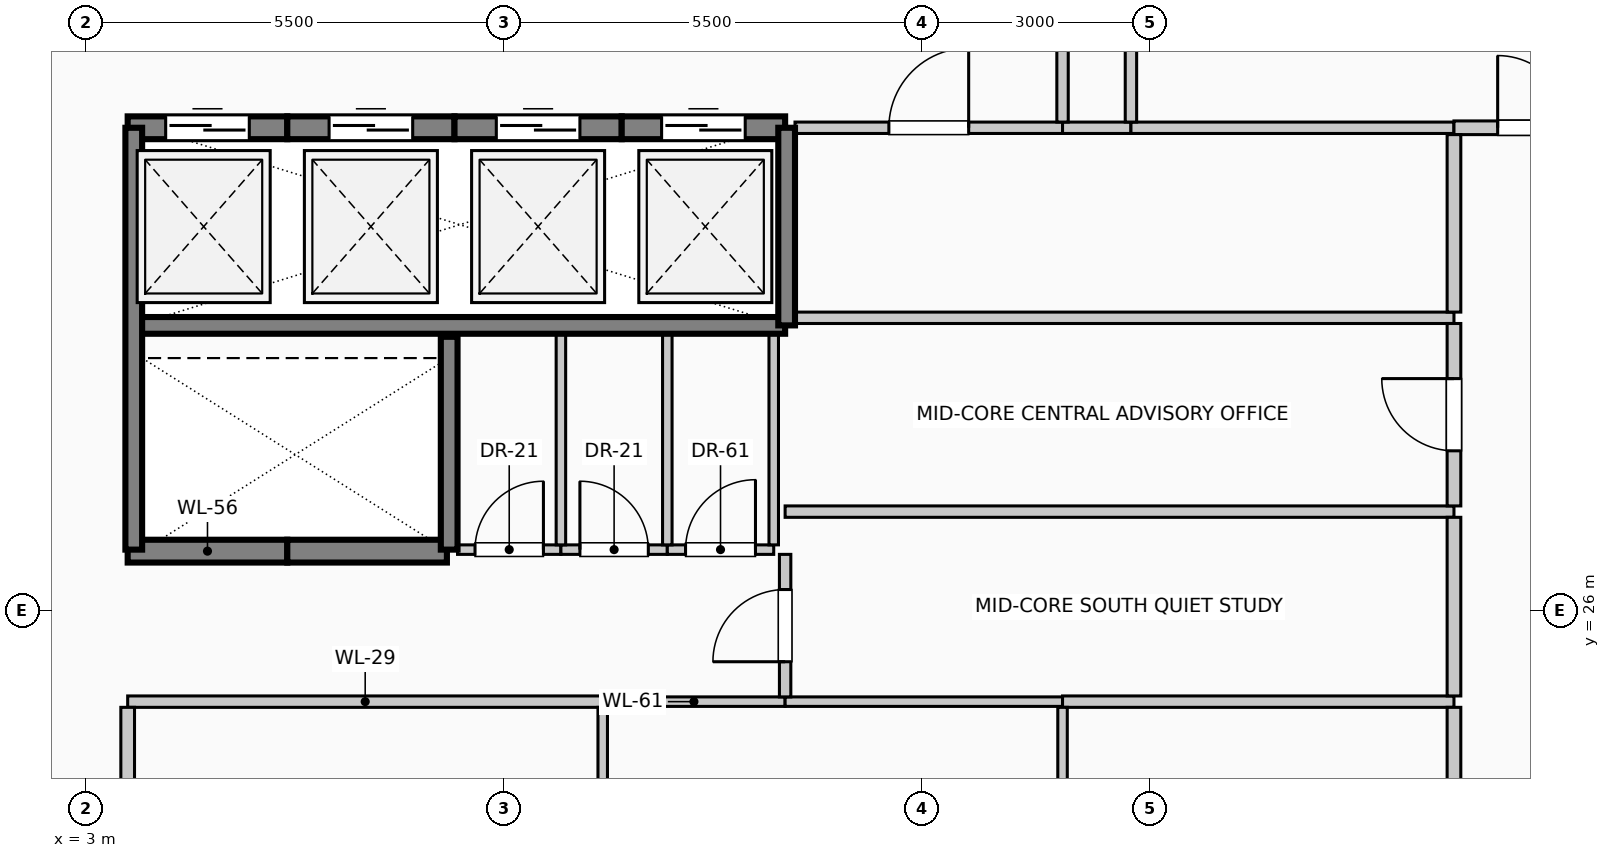
"""IFC4 building model, lengths in metres.
Left out: names, types, materials, properties, quantities, classifications, styles, units other than length and angle.
Written with IfcOpenShell. Run it as: python <this file> out.ifc"""

import sys

from ifc_helpers import new_model, si_unit, direction, frame, frame_2d, origin, place, context, subcontext, project, spatial, rectangle, extrude, element, fill, save


model = new_model("IFC4")
c1 = context("Model", 3, precision=1e-05, world=origin(), true_north=direction((0.0, 1.0)))
c2 = subcontext(c1, "Body", "Model", "MODEL_VIEW")
j1 = project(units=[si_unit("LENGTHUNIT", "METRE"), si_unit("PLANEANGLEUNIT", "RADIAN")], contexts=[c1])
p1 = place(None, origin())
s1 = spatial("IfcSite", under=j1, at=p1, CompositionType="ELEMENT")
p2 = place(p1, origin())
s2 = spatial("IfcBuilding", under=s1, at=p2, CompositionType="ELEMENT")
p3 = place(p2, frame((0.0, 0.0, 252.6)))
s3 = spatial("IfcBuildingStorey", under=s2, at=p3, CompositionType="ELEMENT", Elevation=252.6)
p4 = place(p3, frame((3.55, 32.35, 0.0), z_axis=(0.0, 0.0, 1.0), x_axis=(1.0, 0.0, 0.0)))
e1 = element("IfcWall", 1, at=p4, inside=s3, PredefinedType="SOLIDWALL", context=c2, shape_type="SweptSolid", body=[
    extrude(rectangle(XDim=2.1, YDim=0.3, at=frame_2d((1.05, 0.0))), origin(), (0.0, 0.0, 1.0), 4.0),
])
p5 = place(p4, frame((0.5, 0.0, 0.0)))
e2 = element("IfcOpeningElement", 2, at=p5, cuts=e1, PredefinedType="OPENING", context=c2, shape_type="SweptSolid", body=[
    extrude(rectangle(XDim=1.1, YDim=2.2, at=frame_2d((0.55, 1.1))), frame((0.0, 0.16, 0.0), z_axis=(0.0, -1.0, 0.0), x_axis=(1.0, 0.0, 0.0)), (0.0, 0.0, 1.0), 0.32),
])
p6 = place(p3, frame((5.65, 32.35, 0.0), z_axis=(0.0, 0.0, 1.0), x_axis=(1.0, 0.0, 0.0)))
e3 = element("IfcWall", 3, at=p6, inside=s3, PredefinedType="SOLIDWALL", context=c2, shape_type="SweptSolid", body=[
    extrude(rectangle(XDim=2.2, YDim=0.3, at=frame_2d((1.1, 0.0))), origin(), (0.0, 0.0, 1.0), 4.0),
])
p7 = place(p6, frame((0.55, 0.0, 0.0)))
e4 = element("IfcOpeningElement", 4, at=p7, cuts=e3, PredefinedType="OPENING", context=c2, shape_type="SweptSolid", body=[
    extrude(rectangle(XDim=1.1, YDim=2.2, at=frame_2d((0.55, 1.1))), frame((0.0, 0.16, 0.0), z_axis=(0.0, -1.0, 0.0), x_axis=(1.0, 0.0, 0.0)), (0.0, 0.0, 1.0), 0.32),
])
p8 = place(p3, frame((7.85, 32.35, 0.0), z_axis=(0.0, 0.0, 1.0), x_axis=(1.0, 0.0, 0.0)))
e5 = element("IfcWall", 5, at=p8, inside=s3, PredefinedType="SOLIDWALL", context=c2, shape_type="SweptSolid", body=[
    extrude(rectangle(XDim=2.2, YDim=0.3, at=frame_2d((1.1, 0.0))), origin(), (0.0, 0.0, 1.0), 4.0),
])
p9 = place(p8, frame((0.55, 0.0, 0.0)))
e6 = element("IfcOpeningElement", 6, at=p9, cuts=e5, PredefinedType="OPENING", context=c2, shape_type="SweptSolid", body=[
    extrude(rectangle(XDim=1.1, YDim=2.2, at=frame_2d((0.55, 1.1))), frame((0.0, 0.16, 0.0), z_axis=(0.0, -1.0, 0.0), x_axis=(1.0, 0.0, 0.0)), (0.0, 0.0, 1.0), 0.32),
])
p10 = place(p3, frame((10.05, 32.35, 0.0), z_axis=(0.0, 0.0, 1.0), x_axis=(1.0, 0.0, 0.0)))
e7 = element("IfcWall", 7, at=p10, inside=s3, PredefinedType="SOLIDWALL", context=c2, shape_type="SweptSolid", body=[
    extrude(rectangle(XDim=2.15, YDim=0.3, at=frame_2d((1.075, 0.0))), origin(), (0.0, 0.0, 1.0), 4.0),
])
p11 = place(p10, frame((0.525, 0.0, 0.0)))
e8 = element("IfcOpeningElement", 8, at=p11, cuts=e7, PredefinedType="OPENING", context=c2, shape_type="SweptSolid", body=[
    extrude(rectangle(XDim=1.1, YDim=2.2, at=frame_2d((0.55, 1.1))), frame((0.0, 0.16, 0.0), z_axis=(0.0, -1.0, 0.0), x_axis=(1.0, 0.0, 0.0)), (0.0, 0.0, 1.0), 0.32),
])
p12 = place(p3, frame((5.65, 26.78, 0.0), z_axis=(0.0, 0.0, 1.0), x_axis=(-1.0, 0.0, 0.0)))
e9 = element("IfcWall", 9, at=p12, inside=s3, PredefinedType="SOLIDWALL", context=c2, shape_type="SweptSolid", body=[
    extrude(rectangle(XDim=2.1, YDim=0.3, at=frame_2d((1.05, 0.0))), origin(), (0.0, 0.0, 1.0), 4.0),
])
p13 = place(p3, frame((7.75, 26.78, 0.0), z_axis=(0.0, 0.0, 1.0), x_axis=(-1.0, 0.0, 0.0)))
e10 = element("IfcWall", 10, at=p13, inside=s3, PredefinedType="SOLIDWALL", context=c2, shape_type="SweptSolid", body=[
    extrude(rectangle(XDim=2.1, YDim=0.3, at=frame_2d((1.05, 0.0))), origin(), (0.0, 0.0, 1.0), 4.0),
])
p14 = place(p3, frame((3.55, 29.75, 0.0), z_axis=(0.0, 0.0, 1.0), x_axis=(1.0, 0.0, 0.0)))
e11 = element("IfcWall", 11, at=p14, inside=s3, PredefinedType="SOLIDWALL", context=c2, shape_type="SweptSolid", body=[
    extrude(rectangle(XDim=8.65, YDim=0.22, at=frame_2d((4.325, 0.0))), origin(), (0.0, 0.0, 1.0), 4.0),
])
p15 = place(p3, frame((3.63, 26.8, 0.0), z_axis=(0.0, 0.0, 1.0), x_axis=(0.0, 1.0, 0.0)))
e12 = element("IfcWall", 12, at=p15, inside=s3, PredefinedType="SOLIDWALL", context=c2, shape_type="SweptSolid", body=[
    extrude(rectangle(XDim=5.55, YDim=0.22, at=frame_2d((2.775, 0.0))), origin(), (0.0, 0.0, 1.0), 4.0),
])
p16 = place(p3, frame((7.78, 26.8, 0.0), z_axis=(0.0, 0.0, 1.0), x_axis=(0.0, 1.0, 0.0)))
e13 = element("IfcWall", 13, at=p16, inside=s3, PredefinedType="SOLIDWALL", context=c2, shape_type="SweptSolid", body=[
    extrude(rectangle(XDim=2.8, YDim=0.22, at=frame_2d((1.4, 0.0))), origin(), (0.0, 0.0, 1.0), 4.0),
])
p17 = place(p3, frame((12.22, 29.75, 0.0), z_axis=(0.0, 0.0, 1.0), x_axis=(0.0, 1.0, 0.0)))
e14 = element("IfcWall", 14, at=p17, inside=s3, PredefinedType="SOLIDWALL", context=c2, shape_type="SweptSolid", body=[
    extrude(rectangle(XDim=2.6, YDim=0.22, at=frame_2d((1.3, 0.0))), origin(), (0.0, 0.0, 1.0), 4.0),
])
p18 = place(p3, frame((3.55, 24.8, 0.0), z_axis=(0.0, 0.0, 1.0), x_axis=(1.0, 0.0, 0.0)))
e15 = element("IfcWall", 15, at=p18, inside=s3, PredefinedType="PARTITIONING", context=c2, shape_type="SweptSolid", body=[
    extrude(rectangle(XDim=6.25, YDim=0.15, at=frame_2d((3.125, 0.0))), origin(), (0.0, 0.0, 1.0), 3.75),
])
p19 = place(p3, frame((9.8, 24.8, 0.0), z_axis=(0.0, 0.0, 1.0), x_axis=(1.0, 0.0, 0.0)))
e16 = element("IfcWall", 16, at=p19, inside=s3, PredefinedType="PARTITIONING", context=c2, shape_type="SweptSolid", body=[
    extrude(rectangle(XDim=2.4, YDim=0.125, at=frame_2d((1.2, 0.0))), origin(), (0.0, 0.0, 1.0), 3.75),
])
p20 = place(p3, frame((12.2, 24.8, 0.0), z_axis=(0.0, 0.0, 1.0), x_axis=(1.0, 0.0, 0.0)))
e17 = element("IfcWall", 17, at=p20, inside=s3, PredefinedType="PARTITIONING", context=c2, shape_type="SweptSolid", body=[
    extrude(rectangle(XDim=3.65, YDim=0.125, at=frame_2d((1.825, 0.0))), origin(), (0.0, 0.0, 1.0), 3.75),
])
p21 = place(p3, frame((15.85, 24.8, 0.0), z_axis=(0.0, 0.0, 1.0), x_axis=(1.0, 0.0, 0.0)))
e18 = element("IfcWall", 18, at=p21, inside=s3, PredefinedType="PARTITIONING", context=c2, shape_type="SweptSolid", body=[
    extrude(rectangle(XDim=5.15, YDim=0.15, at=frame_2d((2.575, 0.0))), origin(), (0.0, 0.0, 1.0), 3.75),
])
p22 = place(p3, frame((7.89, 26.8, 0.0), z_axis=(0.0, 0.0, 1.0), x_axis=(1.0, 0.0, 0.0)))
e19 = element("IfcWall", 19, at=p22, inside=s3, PredefinedType="PARTITIONING", context=c2, shape_type="SweptSolid", body=[
    extrude(rectangle(XDim=1.36, YDim=0.125, at=frame_2d((0.68, 0.0))), origin(), (0.0, 0.0, 1.0), 3.75),
])
p23 = place(p22, frame((0.23, 0.0, 0.0)))
e20 = element("IfcOpeningElement", 20, at=p23, cuts=e19, PredefinedType="OPENING", context=c2, shape_type="SweptSolid", body=[
    extrude(rectangle(XDim=0.9, YDim=2.1, at=frame_2d((0.45, 1.05))), frame((0.0, 0.073, 0.0), z_axis=(0.0, -1.0, 0.0), x_axis=(1.0, 0.0, 0.0)), (0.0, 0.0, 1.0), 0.145),
])
p24 = place(p3, frame((9.25, 26.8, 0.0), z_axis=(0.0, 0.0, 1.0), x_axis=(1.0, 0.0, 0.0)))
e21 = element("IfcWall", 21, at=p24, inside=s3, PredefinedType="PARTITIONING", context=c2, shape_type="SweptSolid", body=[
    extrude(rectangle(XDim=1.4, YDim=0.125, at=frame_2d((0.7, 0.0))), origin(), (0.0, 0.0, 1.0), 3.75),
])
p25 = place(p24, frame((0.25, 0.0, 0.0)))
e22 = element("IfcOpeningElement", 22, at=p25, cuts=e21, PredefinedType="OPENING", context=c2, shape_type="SweptSolid", body=[
    extrude(rectangle(XDim=0.9, YDim=2.1, at=frame_2d((0.45, 1.05))), frame((0.0, 0.073, 0.0), z_axis=(0.0, -1.0, 0.0), x_axis=(1.0, 0.0, 0.0)), (0.0, 0.0, 1.0), 0.145),
])
p26 = place(p3, frame((10.65, 26.8, 0.0), z_axis=(0.0, 0.0, 1.0), x_axis=(1.0, 0.0, 0.0)))
e23 = element("IfcWall", 23, at=p26, inside=s3, PredefinedType="PARTITIONING", context=c2, shape_type="SweptSolid", body=[
    extrude(rectangle(XDim=1.4, YDim=0.125, at=frame_2d((0.7, 0.0))), origin(), (0.0, 0.0, 1.0), 3.75),
])
p27 = place(p26, frame((0.24, 0.0, 0.0)))
e24 = element("IfcOpeningElement", 24, at=p27, cuts=e23, PredefinedType="OPENING", context=c2, shape_type="SweptSolid", body=[
    extrude(rectangle(XDim=0.92, YDim=2.1, at=frame_2d((0.46, 1.05))), frame((0.0, 0.073, 0.0), z_axis=(0.0, -1.0, 0.0), x_axis=(1.0, 0.0, 0.0)), (0.0, 0.0, 1.0), 0.145),
])
p28 = place(p3, frame((12.2, 27.3, 0.0), z_axis=(0.0, 0.0, 1.0), x_axis=(1.0, 0.0, 0.0)))
e25 = element("IfcWall", 25, at=p28, inside=s3, PredefinedType="PARTITIONING", context=c2, shape_type="SweptSolid", body=[
    extrude(rectangle(XDim=8.8, YDim=0.15, at=frame_2d((4.4, 0.0))), origin(), (0.0, 0.0, 1.0), 3.75),
])
p29 = place(p3, frame((12.33, 29.85, 0.0), z_axis=(0.0, 0.0, 1.0), x_axis=(1.0, 0.0, 0.0)))
e26 = element("IfcWall", 26, at=p29, inside=s3, PredefinedType="PARTITIONING", context=c2, shape_type="SweptSolid", body=[
    extrude(rectangle(XDim=8.67, YDim=0.15, at=frame_2d((4.335, 0.0))), origin(), (0.0, 0.0, 1.0), 3.75),
])
p30 = place(p3, frame((12.33, 32.35, 0.0), z_axis=(0.0, 0.0, 1.0), x_axis=(1.0, 0.0, 0.0)))
e27 = element("IfcWall", 27, at=p30, inside=s3, PredefinedType="PARTITIONING", context=c2, shape_type="SweptSolid", body=[
    extrude(rectangle(XDim=3.52, YDim=0.15, at=frame_2d((1.76, 0.0))), origin(), (0.0, 0.0, 1.0), 3.75),
])
p31 = place(p30, frame((1.235, 0.0, 0.0)))
e28 = element("IfcOpeningElement", 28, at=p31, cuts=e27, PredefinedType="OPENING", context=c2, shape_type="SweptSolid", body=[
    extrude(rectangle(XDim=1.05, YDim=2.15, at=frame_2d((0.525, 1.075))), frame((0.0, 0.085, 0.0), z_axis=(0.0, -1.0, 0.0), x_axis=(1.0, 0.0, 0.0)), (0.0, 0.0, 1.0), 0.17),
])
p32 = place(p3, frame((15.85, 32.35, 0.0), z_axis=(0.0, 0.0, 1.0), x_axis=(1.0, 0.0, 0.0)))
e29 = element("IfcWall", 29, at=p32, inside=s3, PredefinedType="PARTITIONING", context=c2, shape_type="SweptSolid", body=[
    extrude(rectangle(XDim=0.9, YDim=0.15, at=frame_2d((0.45, 0.0))), origin(), (0.0, 0.0, 1.0), 3.75),
])
p33 = place(p3, frame((16.75, 32.35, 0.0), z_axis=(0.0, 0.0, 1.0), x_axis=(1.0, 0.0, 0.0)))
e30 = element("IfcWall", 30, at=p33, inside=s3, PredefinedType="PARTITIONING", context=c2, shape_type="SweptSolid", body=[
    extrude(rectangle(XDim=4.25, YDim=0.15, at=frame_2d((2.125, 0.0))), origin(), (0.0, 0.0, 1.0), 3.75),
])
p34 = place(p3, frame((21.0, 32.35, 0.0), z_axis=(0.0, 0.0, 1.0), x_axis=(1.0, 0.0, 0.0)))
e31 = element("IfcWall", 31, at=p34, inside=s3, PredefinedType="PARTITIONING", context=c2, shape_type="SweptSolid", body=[
    extrude(rectangle(XDim=2.1, YDim=0.18, at=frame_2d((1.05, 0.0))), origin(), (0.0, 0.0, 1.0), 3.75),
])
p35 = place(p34, frame((0.575, 0.0, 0.0)))
e32 = element("IfcOpeningElement", 32, at=p35, cuts=e31, PredefinedType="OPENING", context=c2, shape_type="SweptSolid", body=[
    extrude(rectangle(XDim=0.95, YDim=2.15, at=frame_2d((0.475, 1.075))), frame((0.0, 0.1, 0.0), z_axis=(0.0, -1.0, 0.0), x_axis=(1.0, 0.0, 0.0)), (0.0, 0.0, 1.0), 0.2),
])
p36 = place(p3, frame((3.55, 17.39, 0.0), z_axis=(0.0, 0.0, 1.0), x_axis=(0.0, 1.0, 0.0)))
e33 = element("IfcWall", 33, at=p36, inside=s3, PredefinedType="PARTITIONING", context=c2, shape_type="SweptSolid", body=[
    extrude(rectangle(XDim=7.335, YDim=0.18, at=frame_2d((3.667, 0.0))), origin(), (0.0, 0.0, 1.0), 3.75),
])
p37 = place(p3, frame((9.25, 26.863, 0.0), z_axis=(0.0, 0.0, 1.0), x_axis=(0.0, 1.0, 0.0)))
e34 = element("IfcWall", 34, at=p37, inside=s3, PredefinedType="PARTITIONING", context=c2, shape_type="SweptSolid", body=[
    extrude(rectangle(XDim=2.777, YDim=0.125, at=frame_2d((1.389, 0.0))), origin(), (0.0, 0.0, 1.0), 3.75),
])
p38 = place(p3, frame((9.8, 17.39, 0.0), z_axis=(0.0, 0.0, 1.0), x_axis=(0.0, 1.0, 0.0)))
e35 = element("IfcWall", 35, at=p38, inside=s3, PredefinedType="PARTITIONING", context=c2, shape_type="SweptSolid", body=[
    extrude(rectangle(XDim=7.335, YDim=0.125, at=frame_2d((3.667, 0.0))), origin(), (0.0, 0.0, 1.0), 3.75),
])
for number, where, z_axis, x_axis in (
    (36, (10.65, 26.863, 0.0), (0.0, 0.0, 1.0), (0.0, 1.0, 0.0)),
    (37, (12.05, 26.863, 0.0), (0.0, 0.0, 1.0), (0.0, 1.0, 0.0)),
):
    element("IfcWall", number, at=place(p3, frame(where, z_axis=z_axis, x_axis=x_axis)), inside=s3, PredefinedType="PARTITIONING", context=c2, shape_type="SweptSolid", body=[
        extrude(rectangle(XDim=2.777, YDim=0.125, at=frame_2d((1.389, 0.0))), origin(), (0.0, 0.0, 1.0), 3.75),
    ])
p39 = place(p3, frame((12.2, 24.863, 0.0), z_axis=(0.0, 0.0, 1.0), x_axis=(0.0, 1.0, 0.0)))
e38 = element("IfcWall", 38, at=p39, inside=s3, PredefinedType="PARTITIONING", context=c2, shape_type="SweptSolid", body=[
    extrude(rectangle(XDim=1.875, YDim=0.15, at=frame_2d((0.938, 0.0))), origin(), (0.0, 0.0, 1.0), 3.75),
])
p40 = place(p39, frame((0.462, 0.0, 0.0)))
e39 = element("IfcOpeningElement", 39, at=p40, cuts=e38, PredefinedType="OPENING", context=c2, shape_type="SweptSolid", body=[
    extrude(rectangle(XDim=0.95, YDim=2.15, at=frame_2d((0.475, 1.075))), frame((0.0, 0.085, 0.0), z_axis=(0.0, -1.0, 0.0), x_axis=(1.0, 0.0, 0.0)), (0.0, 0.0, 1.0), 0.17),
])
p41 = place(p3, frame((15.85, 17.39, 0.0), z_axis=(0.0, 0.0, 1.0), x_axis=(0.0, 1.0, 0.0)))
e40 = element("IfcWall", 40, at=p41, inside=s3, PredefinedType="PARTITIONING", context=c2, shape_type="SweptSolid", body=[
    extrude(rectangle(XDim=7.335, YDim=0.125, at=frame_2d((3.667, 0.0))), origin(), (0.0, 0.0, 1.0), 3.75),
])
p42 = place(p3, frame((15.85, 32.425, 0.0), z_axis=(0.0, 0.0, 1.0), x_axis=(0.0, 1.0, 0.0)))
e41 = element("IfcWall", 41, at=p42, inside=s3, PredefinedType="PARTITIONING", context=c2, shape_type="SweptSolid", body=[
    extrude(rectangle(XDim=1.725, YDim=0.15, at=frame_2d((0.862, 0.0))), origin(), (0.0, 0.0, 1.0), 3.75),
])
p43 = place(p3, frame((16.75, 32.425, 0.0), z_axis=(0.0, 0.0, 1.0), x_axis=(0.0, 1.0, 0.0)))
e42 = element("IfcWall", 42, at=p43, inside=s3, PredefinedType="PARTITIONING", context=c2, shape_type="SweptSolid", body=[
    extrude(rectangle(XDim=1.15, YDim=0.15, at=frame_2d((0.575, 0.0))), origin(), (0.0, 0.0, 1.0), 3.75),
])
p44 = place(p3, frame((21.0, 17.39, 0.0), z_axis=(0.0, 0.0, 1.0), x_axis=(0.0, 1.0, 0.0)))
e43 = element("IfcWall", 43, at=p44, inside=s3, PredefinedType="PARTITIONING", context=c2, shape_type="SweptSolid", body=[
    extrude(rectangle(XDim=7.335, YDim=0.18, at=frame_2d((3.667, 0.0))), origin(), (0.0, 0.0, 1.0), 3.75),
])
p45 = place(p3, frame((21.0, 24.875, 0.0), z_axis=(0.0, 0.0, 1.0), x_axis=(0.0, 1.0, 0.0)))
e44 = element("IfcWall", 44, at=p45, inside=s3, PredefinedType="PARTITIONING", context=c2, shape_type="SweptSolid", body=[
    extrude(rectangle(XDim=2.35, YDim=0.18, at=frame_2d((1.175, 0.0))), origin(), (0.0, 0.0, 1.0), 3.75),
])
p46 = place(p3, frame((21.0, 27.375, 0.0), z_axis=(0.0, 0.0, 1.0), x_axis=(0.0, 1.0, 0.0)))
e45 = element("IfcWall", 45, at=p46, inside=s3, PredefinedType="PARTITIONING", context=c2, shape_type="SweptSolid", body=[
    extrude(rectangle(XDim=2.4, YDim=0.18, at=frame_2d((1.2, 0.0))), origin(), (0.0, 0.0, 1.0), 3.75),
])
p47 = place(p46, frame((0.725, 0.0, 0.0)))
e46 = element("IfcOpeningElement", 46, at=p47, cuts=e45, PredefinedType="OPENING", context=c2, shape_type="SweptSolid", body=[
    extrude(rectangle(XDim=0.95, YDim=2.15, at=frame_2d((0.475, 1.075))), frame((0.0, 0.1, 0.0), z_axis=(0.0, -1.0, 0.0), x_axis=(1.0, 0.0, 0.0)), (0.0, 0.0, 1.0), 0.2),
])
p48 = place(p3, frame((21.0, 29.925, 0.0), z_axis=(0.0, 0.0, 1.0), x_axis=(0.0, 1.0, 0.0)))
e47 = element("IfcWall", 47, at=p48, inside=s3, PredefinedType="PARTITIONING", context=c2, shape_type="SweptSolid", body=[
    extrude(rectangle(XDim=2.335, YDim=0.18, at=frame_2d((1.167, 0.0))), origin(), (0.0, 0.0, 1.0), 3.75),
])
p49 = place(p5, origin())
e48 = element("IfcDoor", 48, at=p49, inside=s3, OperationType="SLIDING_TO_LEFT", PredefinedType="DOOR", context=c2, shape_type="SweptSolid", body=[
    extrude(rectangle(XDim=1.1, YDim=2.2, at=frame_2d((0.55, 1.1))), frame((0.0, 0.025, 0.0), z_axis=(0.0, -1.0, 0.0), x_axis=(1.0, 0.0, 0.0)), (0.0, 0.0, 1.0), 0.05),
])
fill(e2, e48)
p50 = place(p7, origin())
e49 = element("IfcDoor", 49, at=p50, inside=s3, OperationType="SLIDING_TO_RIGHT", PredefinedType="DOOR", context=c2, shape_type="SweptSolid", body=[
    extrude(rectangle(XDim=1.1, YDim=2.2, at=frame_2d((0.55, 1.1))), frame((0.0, 0.025, 0.0), z_axis=(0.0, -1.0, 0.0), x_axis=(1.0, 0.0, 0.0)), (0.0, 0.0, 1.0), 0.05),
])
fill(e4, e49)
p51 = place(p9, origin())
e50 = element("IfcDoor", 50, at=p51, inside=s3, OperationType="SLIDING_TO_LEFT", PredefinedType="DOOR", context=c2, shape_type="SweptSolid", body=[
    extrude(rectangle(XDim=1.1, YDim=2.2, at=frame_2d((0.55, 1.1))), frame((0.0, 0.025, 0.0), z_axis=(0.0, -1.0, 0.0), x_axis=(1.0, 0.0, 0.0)), (0.0, 0.0, 1.0), 0.05),
])
fill(e6, e50)
p52 = place(p11, origin())
e51 = element("IfcDoor", 51, at=p52, inside=s3, OperationType="SLIDING_TO_RIGHT", PredefinedType="DOOR", context=c2, shape_type="SweptSolid", body=[
    extrude(rectangle(XDim=1.1, YDim=2.2, at=frame_2d((0.55, 1.1))), frame((0.0, 0.025, 0.0), z_axis=(0.0, -1.0, 0.0), x_axis=(1.0, 0.0, 0.0)), (0.0, 0.0, 1.0), 0.05),
])
fill(e8, e51)
p53 = place(p23, origin())
e52 = element("IfcDoor", 52, at=p53, inside=s3, OperationType="SINGLE_SWING_RIGHT", PredefinedType="DOOR", context=c2, shape_type="SweptSolid", body=[
    extrude(rectangle(XDim=0.9, YDim=2.1, at=frame_2d((0.45, 1.05))), frame((0.0, 0.025, 0.0), z_axis=(0.0, -1.0, 0.0), x_axis=(1.0, 0.0, 0.0)), (0.0, 0.0, 1.0), 0.05),
])
fill(e20, e52)
p54 = place(p25, origin())
e53 = element("IfcDoor", 53, at=p54, inside=s3, OperationType="SINGLE_SWING_LEFT", PredefinedType="DOOR", context=c2, shape_type="SweptSolid", body=[
    extrude(rectangle(XDim=0.9, YDim=2.1, at=frame_2d((0.45, 1.05))), frame((0.0, 0.025, 0.0), z_axis=(0.0, -1.0, 0.0), x_axis=(1.0, 0.0, 0.0)), (0.0, 0.0, 1.0), 0.05),
])
fill(e22, e53)
p55 = place(p27, origin())
e54 = element("IfcDoor", 54, at=p55, inside=s3, OperationType="SINGLE_SWING_RIGHT", PredefinedType="DOOR", context=c2, shape_type="SweptSolid", body=[
    extrude(rectangle(XDim=0.92, YDim=2.1, at=frame_2d((0.46, 1.05))), frame((0.0, 0.025, 0.0), z_axis=(0.0, -1.0, 0.0), x_axis=(1.0, 0.0, 0.0)), (0.0, 0.0, 1.0), 0.05),
])
fill(e24, e54)
p56 = place(p31, origin())
e55 = element("IfcDoor", 55, at=p56, inside=s3, OperationType="SINGLE_SWING_RIGHT", PredefinedType="DOOR", context=c2, shape_type="SweptSolid", body=[
    extrude(rectangle(XDim=1.05, YDim=2.15, at=frame_2d((0.525, 1.075))), frame((0.0, 0.025, 0.0), z_axis=(0.0, -1.0, 0.0), x_axis=(1.0, 0.0, 0.0)), (0.0, 0.0, 1.0), 0.05),
])
fill(e28, e55)
p57 = place(p35, origin())
e56 = element("IfcDoor", 56, at=p57, inside=s3, OperationType="SINGLE_SWING_LEFT", PredefinedType="DOOR", context=c2, shape_type="SweptSolid", body=[
    extrude(rectangle(XDim=0.95, YDim=2.15, at=frame_2d((0.475, 1.075))), frame((0.0, 0.025, 0.0), z_axis=(0.0, -1.0, 0.0), x_axis=(1.0, 0.0, 0.0)), (0.0, 0.0, 1.0), 0.05),
])
fill(e32, e56)
p58 = place(p40, origin())
e57 = element("IfcDoor", 57, at=p58, inside=s3, OperationType="SINGLE_SWING_LEFT", PredefinedType="DOOR", context=c2, shape_type="SweptSolid", body=[
    extrude(rectangle(XDim=0.95, YDim=2.15, at=frame_2d((0.475, 1.075))), frame((0.0, 0.025, 0.0), z_axis=(0.0, -1.0, 0.0), x_axis=(1.0, 0.0, 0.0)), (0.0, 0.0, 1.0), 0.05),
])
fill(e39, e57)
p59 = place(p47, origin())
e58 = element("IfcDoor", 58, at=p59, inside=s3, OperationType="SINGLE_SWING_RIGHT", PredefinedType="DOOR", context=c2, shape_type="SweptSolid", body=[
    extrude(rectangle(XDim=0.95, YDim=2.15, at=frame_2d((0.475, 1.075))), frame((0.0, 0.025, 0.0), z_axis=(0.0, -1.0, 0.0), x_axis=(1.0, 0.0, 0.0)), (0.0, 0.0, 1.0), 0.05),
])
fill(e46, e58)
save(model, sys.argv[1])
